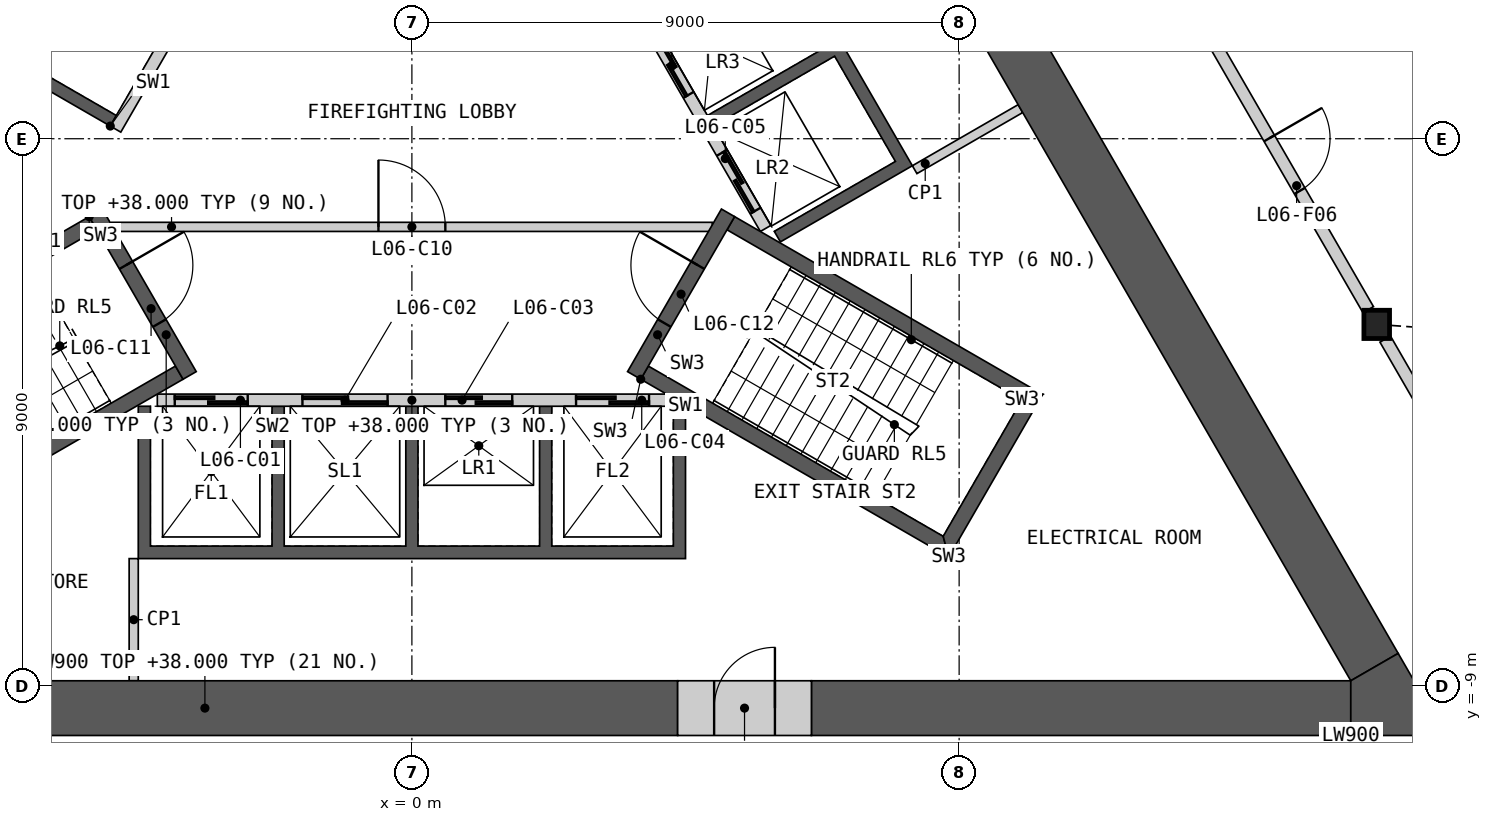
"""IFC4 building model, lengths in metres.
Left out: names, types, materials, properties, quantities, classifications, styles, units other than length and angle.
Written with IfcOpenShell. Run it as: python <this file> out.ifc"""

import sys

from ifc_helpers import new_model, si_unit, direction, frame, frame_2d, origin, origin_2d, place, context, subcontext, project, spatial, polyline, rectangle, i_section, outline, extrude, element, fill, save


model = new_model("IFC4")
c1 = context("Model", 3, precision=1e-05, world=origin(), true_north=direction((0.0, 1.0)))
c2 = subcontext(c1, "Body", "Model", "MODEL_VIEW")
j1 = project(units=[si_unit("LENGTHUNIT", "METRE"), si_unit("PLANEANGLEUNIT", "RADIAN")], contexts=[c1])
p1 = place(None, origin())
s1 = spatial("IfcSite", under=j1, at=p1, CompositionType="ELEMENT")
p2 = place(p1, origin())
s2 = spatial("IfcBuilding", under=s1, at=p2, CompositionType="ELEMENT")
p3 = place(p2, frame((0.0, 0.0, 34.2)))
s3 = spatial("IfcBuildingStorey", under=s2, at=p3, CompositionType="ELEMENT", Elevation=34.2)
p4 = place(p3, frame((15.868, -3.054, 0.0), z_axis=(0.0, 0.0, 1.0), x_axis=(1.0, 0.0, 0.0)))
e1 = element("IfcColumn", 1, at=p4, inside=s3, PredefinedType="COLUMN", context=c2, shape_type="SweptSolid", body=[
    extrude(i_section(OverallWidth=0.421, OverallDepth=0.465, WebThickness=0.045, FlangeThickness=0.072, at=origin_2d()), origin(), (0.0, 0.0, 1.0), 4.2),
])
p5 = place(p3, origin())
e2 = element("IfcWall", 2, at=p5, inside=s3, PredefinedType="SHEAR", context=c2, shape_type="SweptSolid", body=[
    extrude(outline(polyline([(4.5, -4.4), (4.5, -6.906), (-4.5, -6.906), (-4.5, -4.4), (-4.3, -4.4), (-4.3, -6.7), (-2.3, -6.7), (-2.3, -4.4), (-2.1, -4.4), (-2.1, -6.7), (-0.1, -6.7), (-0.1, -4.4), (0.1, -4.4), (0.1, -6.7), (2.1, -6.7), (2.1, -4.4), (2.3, -4.4), (2.3, -6.7), (4.3, -6.7), (4.3, -4.4), (4.5, -4.4)])), origin(), (0.0, 0.0, 1.0), 3.8),
])
p6 = place(p3, frame((-4.187, -4.3, 0.0), z_axis=(0.0, 0.0, 1.0), x_axis=(1.0, 0.0, 0.0)))
e3 = element("IfcWall", 3, at=p6, inside=s3, PredefinedType="SOLIDWALL", context=c2, shape_type="SweptSolid", body=[
    extrude(rectangle(XDim=8.373, YDim=0.2, at=frame_2d((4.187, 0.0))), origin(), (0.0, 0.0, 1.0), 3.8),
])
p7 = place(p6, frame((0.287, 0.0, 0.0)))
e4 = element("IfcOpeningElement", 4, at=p7, cuts=e3, PredefinedType="OPENING", context=c2, shape_type="SweptSolid", body=[
    extrude(rectangle(XDim=1.2, YDim=2.1, at=frame_2d((0.6, 1.05))), frame((0.0, 0.11, 0.0), z_axis=(0.0, -1.0, 0.0), x_axis=(1.0, 0.0, 0.0)), (0.0, 0.0, 1.0), 0.22),
])
p8 = place(p6, frame((2.387, 0.0, 0.0)))
e5 = element("IfcOpeningElement", 5, at=p8, cuts=e3, PredefinedType="OPENING", context=c2, shape_type="SweptSolid", body=[
    extrude(rectangle(XDim=1.4, YDim=2.1, at=frame_2d((0.7, 1.05))), frame((0.0, 0.11, 0.0), z_axis=(0.0, -1.0, 0.0), x_axis=(1.0, 0.0, 0.0)), (0.0, 0.0, 1.0), 0.22),
])
p9 = place(p6, frame((4.737, 0.0, 0.0)))
e6 = element("IfcOpeningElement", 6, at=p9, cuts=e3, PredefinedType="OPENING", context=c2, shape_type="SweptSolid", body=[
    extrude(rectangle(XDim=1.1, YDim=2.1, at=frame_2d((0.55, 1.05))), frame((0.0, 0.11, 0.0), z_axis=(0.0, -1.0, 0.0), x_axis=(1.0, 0.0, 0.0)), (0.0, 0.0, 1.0), 0.22),
])
p10 = place(p6, frame((6.887, 0.0, 0.0)))
e7 = element("IfcOpeningElement", 7, at=p10, cuts=e3, PredefinedType="OPENING", context=c2, shape_type="SweptSolid", body=[
    extrude(rectangle(XDim=1.2, YDim=2.1, at=frame_2d((0.6, 1.05))), frame((0.0, 0.11, 0.0), z_axis=(0.0, -1.0, 0.0), x_axis=(1.0, 0.0, 0.0)), (0.0, 0.0, 1.0), 0.22),
])
p11 = place(p3, origin())
e8 = element("IfcWall", 8, at=p11, inside=s3, PredefinedType="SHEAR", context=c2, shape_type="SweptSolid", body=[
    extrude(outline(polyline([(2.66, 4.192), (4.831, 5.445), (8.231, -0.444), (6.061, -1.697), (5.96, -1.524), (7.952, -0.374), (6.952, 1.358), (4.96, 0.208), (4.861, 0.381), (6.852, 1.531), (5.852, 3.263), (3.861, 2.113), (3.76, 2.287), (5.752, 3.437), (4.752, 5.169), (2.76, 4.019), (2.66, 4.192)])), origin(), (0.0, 0.0, 1.0), 3.8),
])
p12 = place(p3, frame((5.817, -1.476, 0.0), z_axis=(0.0, 0.0, 1.0), x_axis=(-0.500002616675, 0.866023893041, 0.0)))
e9 = element("IfcWall", 9, at=p12, inside=s3, PredefinedType="SOLIDWALL", context=c2, shape_type="SweptSolid", body=[
    extrude(rectangle(XDim=8.373, YDim=0.2, at=frame_2d((4.187, 0.0))), origin(), (0.0, 0.0, 1.0), 3.8),
])
p13 = place(p12, frame((0.337, 0.0, 0.0)))
e10 = element("IfcOpeningElement", 10, at=p13, cuts=e9, PredefinedType="OPENING", context=c2, shape_type="SweptSolid", body=[
    extrude(rectangle(XDim=1.1, YDim=2.1, at=frame_2d((0.55, 1.05))), frame((0.0, 0.11, 0.0), z_axis=(0.0, -1.0, 0.0), x_axis=(1.0, 0.0, 0.0)), (0.0, 0.0, 1.0), 0.22),
])
p14 = place(p12, frame((2.537, 0.0, 0.0)))
e11 = element("IfcOpeningElement", 11, at=p14, cuts=e9, PredefinedType="OPENING", context=c2, shape_type="SweptSolid", body=[
    extrude(rectangle(XDim=1.1, YDim=2.1, at=frame_2d((0.55, 1.05))), frame((0.0, 0.11, 0.0), z_axis=(0.0, -1.0, 0.0), x_axis=(1.0, 0.0, 0.0)), (0.0, 0.0, 1.0), 0.22),
])
p15 = place(p12, frame((4.737, 0.0, 0.0)))
e12 = element("IfcOpeningElement", 12, at=p15, cuts=e9, PredefinedType="OPENING", context=c2, shape_type="SweptSolid", body=[
    extrude(rectangle(XDim=1.1, YDim=2.1, at=frame_2d((0.55, 1.05))), frame((0.0, 0.11, 0.0), z_axis=(0.0, -1.0, 0.0), x_axis=(1.0, 0.0, 0.0)), (0.0, 0.0, 1.0), 0.22),
])
p16 = place(p12, frame((7.037, 0.0, 0.0)))
e13 = element("IfcOpeningElement", 13, at=p16, cuts=e9, PredefinedType="OPENING", context=c2, shape_type="SweptSolid", body=[
    extrude(rectangle(XDim=0.9, YDim=2.1, at=frame_2d((0.45, 1.05))), frame((0.0, 0.11, 0.0), z_axis=(0.0, -1.0, 0.0), x_axis=(1.0, 0.0, 0.0)), (0.0, 0.0, 1.0), 0.22),
])
p17 = place(p3, origin())
e14 = element("IfcWall", 14, at=p17, inside=s3, PredefinedType="SHEAR", context=c2, shape_type="SweptSolid", body=[
    extrude(outline(polyline([(-4.96, 0.208), (-7.131, 1.461), (-3.731, 7.35), (-1.561, 6.097), (-1.66, 5.924), (-3.652, 7.074), (-5.752, 3.437), (-3.76, 2.287), (-3.861, 2.113), (-5.852, 3.263), (-6.852, 1.531), (-4.861, 0.381), (-4.96, 0.208)])), origin(), (0.0, 0.0, 1.0), 3.8),
])
p18 = place(p3, frame((-1.631, 5.776, 0.0), z_axis=(0.0, 0.0, 1.0), x_axis=(-0.499992876559, -0.866029516466, 0.0)))
e15 = element("IfcWall", 15, at=p18, inside=s3, PredefinedType="SOLIDWALL", context=c2, shape_type="SweptSolid", body=[
    extrude(rectangle(XDim=6.486, YDim=0.2, at=frame_2d((3.243, 0.0))), origin(), (0.0, 0.0, 1.0), 3.8),
])
p19 = place(p18, frame((1.537, 0.0, 0.0)))
e16 = element("IfcOpeningElement", 16, at=p19, cuts=e15, PredefinedType="OPENING", context=c2, shape_type="SweptSolid", body=[
    extrude(rectangle(XDim=0.9, YDim=2.1, at=frame_2d((0.45, 1.05))), frame((0.0, 0.11, 0.0), z_axis=(0.0, -1.0, 0.0), x_axis=(1.0, 0.0, 0.0)), (0.0, 0.0, 1.0), 0.22),
])
p20 = place(p3, frame((-4.941, -1.45, 0.0), z_axis=(0.0, 0.0, 1.0), x_axis=(1.0, 0.0, 0.0)))
e17 = element("IfcWall", 17, at=p20, inside=s3, PredefinedType="PARTITIONING", context=c2, shape_type="SweptSolid", body=[
    extrude(rectangle(XDim=9.882, YDim=0.15, at=frame_2d((4.941, 0.0))), origin(), (0.0, 0.0, 1.0), 3.8),
])
p21 = place(p20, frame((4.391, 0.0, 0.0)))
e18 = element("IfcOpeningElement", 18, at=p21, cuts=e17, PredefinedType="OPENING", context=c2, shape_type="SweptSolid", body=[
    extrude(rectangle(XDim=1.1, YDim=2.1, at=frame_2d((0.55, 1.05))), frame((0.0, 0.085, 0.0), z_axis=(0.0, -1.0, 0.0), x_axis=(1.0, 0.0, 0.0)), (0.0, 0.0, 1.0), 0.17),
])
p22 = place(p3, origin())
e19 = element("IfcWall", 19, at=p22, inside=s3, PredefinedType="SHEAR", context=c2, shape_type="SweptSolid", body=[
    extrude(outline(polyline([(-5.307, -1.281), (-10.374, -4.206), (-10.032, -4.298), (-5.182, -1.498), (-5.307, -1.281)])), origin(), (0.0, 0.0, 1.0), 3.8),
])
p23 = place(p3, origin())
e20 = element("IfcWall", 20, at=p23, inside=s3, PredefinedType="SHEAR", context=c2, shape_type="SweptSolid", body=[
    extrude(outline(polyline([(-8.738, -6.539), (-8.83, -6.881), (-3.763, -3.956), (-3.888, -3.739), (-8.738, -6.539)])), origin(), (0.0, 0.0, 1.0), 3.8),
])
p24 = place(p3, frame((-5.199, -1.219, 0.0), z_axis=(0.0, 0.0, 1.0), x_axis=(0.499982516597, -0.866035497597, 0.0)))
e21 = element("IfcWall", 21, at=p24, inside=s3, PredefinedType="SHEAR", context=c2, shape_type="SweptSolid", body=[
    extrude(rectangle(XDim=3.088, YDim=0.25, at=frame_2d((1.544, 0.0))), origin(), (0.0, 0.0, 1.0), 3.8),
])
p25 = place(p24, frame((0.994, 0.0, 0.0)))
e22 = element("IfcOpeningElement", 22, at=p25, cuts=e21, PredefinedType="OPENING", context=c2, shape_type="SweptSolid", body=[
    extrude(rectangle(XDim=1.1, YDim=2.1, at=frame_2d((0.55, 1.05))), frame((0.0, 0.135, 0.0), z_axis=(0.0, -1.0, 0.0), x_axis=(1.0, 0.0, 0.0)), (0.0, 0.0, 1.0), 0.27),
])
p26 = place(p3, origin())
e23 = element("IfcWall", 23, at=p26, inside=s3, PredefinedType="SHEAR", context=c2, shape_type="SweptSolid", body=[
    extrude(outline(polyline([(3.763, -3.956), (8.83, -6.881), (8.738, -6.539), (3.888, -3.739), (3.763, -3.956)])), origin(), (0.0, 0.0, 1.0), 3.8),
])
p27 = place(p3, origin())
e24 = element("IfcWall", 24, at=p27, inside=s3, PredefinedType="SHEAR", context=c2, shape_type="SweptSolid", body=[
    extrude(outline(polyline([(8.83, -6.881), (10.374, -4.206), (10.032, -4.298), (8.738, -6.539), (8.83, -6.881)])), origin(), (0.0, 0.0, 1.0), 3.8),
])
p28 = place(p3, origin())
e25 = element("IfcWall", 25, at=p28, inside=s3, PredefinedType="SHEAR", context=c2, shape_type="SweptSolid", body=[
    extrude(outline(polyline([(10.032, -4.298), (10.374, -4.206), (5.307, -1.281), (5.182, -1.498), (10.032, -4.298)])), origin(), (0.0, 0.0, 1.0), 3.8),
])
p29 = place(p3, frame((3.655, -3.893, 0.0), z_axis=(0.0, 0.0, 1.0), x_axis=(0.499982516597, 0.866035497597, 0.0)))
e26 = element("IfcWall", 26, at=p29, inside=s3, PredefinedType="SHEAR", context=c2, shape_type="SweptSolid", body=[
    extrude(rectangle(XDim=3.088, YDim=0.25, at=frame_2d((1.544, 0.0))), origin(), (0.0, 0.0, 1.0), 3.8),
])
p30 = place(p29, frame((0.994, 0.0, 0.0)))
e27 = element("IfcOpeningElement", 27, at=p30, cuts=e26, PredefinedType="OPENING", context=c2, shape_type="SweptSolid", body=[
    extrude(rectangle(XDim=1.1, YDim=2.1, at=frame_2d((0.55, 1.05))), frame((0.0, 0.135, 0.0), z_axis=(0.0, -1.0, 0.0), x_axis=(1.0, 0.0, 0.0)), (0.0, 0.0, 1.0), 0.27),
])
p31 = place(p3, frame((8.268, -0.509, 0.0), z_axis=(0.0, 0.0, 1.0), x_axis=(0.866035824272, 0.499981950752, 0.0)))
e28 = element("IfcWall", 28, at=p31, inside=s3, PredefinedType="PARTITIONING", context=c2, shape_type="SweptSolid", body=[
    extrude(rectangle(XDim=2.009, YDim=0.15, at=frame_2d((1.004, 0.0))), origin(), (0.0, 0.0, 1.0), 3.8),
])
p32 = place(p3, frame((-4.575, -6.906, 0.0), z_axis=(0.0, 0.0, 1.0), x_axis=(0.0, -1.0, 0.0)))
e29 = element("IfcWall", 29, at=p32, inside=s3, PredefinedType="PARTITIONING", context=c2, shape_type="SweptSolid", body=[
    extrude(rectangle(XDim=2.009, YDim=0.15, at=frame_2d((1.004, 0.0))), origin(), (0.0, 0.0, 1.0), 3.8),
])
p33 = place(p3, frame((-11.179, -9.365, 0.0), z_axis=(0.0, 0.0, 1.0), x_axis=(1.0, 0.0, 0.0)))
e30 = element("IfcWall", 30, at=p33, inside=s3, PredefinedType="SHEAR", context=c2, shape_type="SweptSolid", body=[
    extrude(rectangle(XDim=15.55, YDim=0.9, at=frame_2d((7.775, 0.0))), origin(), (0.0, 0.0, 1.0), 3.8),
])
p34 = place(p3, frame((6.571, -9.365, 0.0), z_axis=(0.0, 0.0, 1.0), x_axis=(1.0, 0.0, 0.0)))
e31 = element("IfcWall", 31, at=p34, inside=s3, PredefinedType="SHEAR", context=c2, shape_type="SweptSolid", body=[
    extrude(rectangle(XDim=8.871, YDim=0.9, at=frame_2d((4.435, 0.0))), origin(), (0.0, 0.0, 1.0), 3.8),
])
p35 = place(p3, frame((15.831, -8.69, 0.0), z_axis=(0.0, 0.0, 1.0), x_axis=(-0.499997452939, 0.866026874326, 0.0)))
e32 = element("IfcWall", 32, at=p35, inside=s3, PredefinedType="SHEAR", context=c2, shape_type="SweptSolid", body=[
    extrude(rectangle(XDim=13.141, YDim=0.9, at=frame_2d((6.571, 0.0))), origin(), (0.0, 0.0, 1.0), 3.8),
])
p36 = place(p3, origin())
e33 = element("IfcWall", 33, at=p36, inside=s3, PredefinedType="SHEAR", context=c2, shape_type="SweptSolid", body=[
    extrude(outline(polyline([(15.441, -9.815), (15.441, -8.915), (16.221, -8.465), (17.0, -9.815), (15.441, -9.815)])), origin(), (0.0, 0.0, 1.0), 3.8),
])
p37 = place(p3, frame((4.371, -9.365, 0.0), z_axis=(0.0, 0.0, 1.0), x_axis=(1.0, 0.0, 0.0)))
e34 = element("IfcWall", 34, at=p37, inside=s3, PredefinedType="SHEAR", context=c2, shape_type="SweptSolid", body=[
    extrude(rectangle(XDim=2.2, YDim=0.9, at=frame_2d((1.1, 0.0))), origin(), (0.0, 0.0, 1.0), 3.8),
])
p38 = place(p37, frame((0.6, 0.0, 0.0)))
e35 = element("IfcOpeningElement", 35, at=p38, cuts=e34, PredefinedType="OPENING", context=c2, shape_type="SweptSolid", body=[
    extrude(rectangle(XDim=1.0, YDim=2.1, at=frame_2d((0.5, 1.05))), frame((0.0, 0.46, 0.0), z_axis=(0.0, -1.0, 0.0), x_axis=(1.0, 0.0, 0.0)), (0.0, 0.0, 1.0), 0.92),
])
p39 = place(p3, frame((10.719, 5.865, 0.0), z_axis=(0.0, 0.0, 1.0), x_axis=(0.49999175339, -0.866030164915, 0.0)))
e36 = element("IfcWall", 36, at=p39, inside=s3, PredefinedType="PARTITIONING", context=c2, shape_type="SweptSolid", body=[
    extrude(rectangle(XDim=10.019, YDim=0.2, at=frame_2d((5.009, 0.0))), origin(), (0.0, 0.0, 1.0), 3.8),
])
p40 = place(p39, frame((6.764, 0.0, 0.0)))
e37 = element("IfcOpeningElement", 37, at=p40, cuts=e36, PredefinedType="OPENING", context=c2, shape_type="SweptSolid", body=[
    extrude(rectangle(XDim=1.0, YDim=2.1, at=frame_2d((0.5, 1.05))), frame((0.0, 0.11, 0.0), z_axis=(0.0, -1.0, 0.0), x_axis=(1.0, 0.0, 0.0)), (0.0, 0.0, 1.0), 0.22),
])
p41 = place(p3, frame((16.008, -3.296, 0.0), z_axis=(0.0, 0.0, 1.0), x_axis=(0.499984737558, -0.86603421538, 0.0)))
e38 = element("IfcWall", 38, at=p41, inside=s3, PredefinedType="PARTITIONING", context=c2, shape_type="SweptSolid", body=[
    extrude(rectangle(XDim=6.473, YDim=0.2, at=frame_2d((3.236, 0.0))), origin(), (0.0, 0.0, 1.0), 3.8),
])
p42 = place(p41, frame((4.512, 0.0, 0.0)))
e39 = element("IfcOpeningElement", 39, at=p42, cuts=e38, PredefinedType="OPENING", context=c2, shape_type="SweptSolid", body=[
    extrude(rectangle(XDim=1.0, YDim=2.1, at=frame_2d((0.5, 1.05))), frame((0.0, 0.11, 0.0), z_axis=(0.0, -1.0, 0.0), x_axis=(1.0, 0.0, 0.0)), (0.0, 0.0, 1.0), 0.22),
])
p43 = place(p7, origin())
e40 = element("IfcDoor", 40, at=p43, inside=s3, OperationType="SLIDING_TO_LEFT", PredefinedType="DOOR", context=c2, shape_type="SweptSolid", body=[
    extrude(rectangle(XDim=1.2, YDim=2.1, at=frame_2d((0.6, 1.05))), frame((0.0, 0.025, 0.0), z_axis=(0.0, -1.0, 0.0), x_axis=(1.0, 0.0, 0.0)), (0.0, 0.0, 1.0), 0.05),
])
fill(e4, e40)
p44 = place(p8, origin())
e41 = element("IfcDoor", 41, at=p44, inside=s3, OperationType="SLIDING_TO_LEFT", PredefinedType="DOOR", context=c2, shape_type="SweptSolid", body=[
    extrude(rectangle(XDim=1.4, YDim=2.1, at=frame_2d((0.7, 1.05))), frame((0.0, 0.025, 0.0), z_axis=(0.0, -1.0, 0.0), x_axis=(1.0, 0.0, 0.0)), (0.0, 0.0, 1.0), 0.05),
])
fill(e5, e41)
p45 = place(p9, origin())
e42 = element("IfcDoor", 42, at=p45, inside=s3, OperationType="SLIDING_TO_LEFT", PredefinedType="DOOR", context=c2, shape_type="SweptSolid", body=[
    extrude(rectangle(XDim=1.1, YDim=2.1, at=frame_2d((0.55, 1.05))), frame((0.0, 0.025, 0.0), z_axis=(0.0, -1.0, 0.0), x_axis=(1.0, 0.0, 0.0)), (0.0, 0.0, 1.0), 0.05),
])
fill(e6, e42)
p46 = place(p10, origin())
e43 = element("IfcDoor", 43, at=p46, inside=s3, OperationType="SLIDING_TO_LEFT", PredefinedType="DOOR", context=c2, shape_type="SweptSolid", body=[
    extrude(rectangle(XDim=1.2, YDim=2.1, at=frame_2d((0.6, 1.05))), frame((0.0, 0.025, 0.0), z_axis=(0.0, -1.0, 0.0), x_axis=(1.0, 0.0, 0.0)), (0.0, 0.0, 1.0), 0.05),
])
fill(e7, e43)
p47 = place(p13, origin())
e44 = element("IfcDoor", 44, at=p47, inside=s3, OperationType="SLIDING_TO_LEFT", PredefinedType="DOOR", context=c2, shape_type="SweptSolid", body=[
    extrude(rectangle(XDim=1.1, YDim=2.1, at=frame_2d((0.55, 1.05))), frame((0.0, 0.025, 0.0), z_axis=(0.0, -1.0, 0.0), x_axis=(1.0, 0.0, 0.0)), (0.0, 0.0, 1.0), 0.05),
])
fill(e10, e44)
p48 = place(p14, origin())
e45 = element("IfcDoor", 45, at=p48, inside=s3, OperationType="SLIDING_TO_LEFT", PredefinedType="DOOR", context=c2, shape_type="SweptSolid", body=[
    extrude(rectangle(XDim=1.1, YDim=2.1, at=frame_2d((0.55, 1.05))), frame((0.0, 0.025, 0.0), z_axis=(0.0, -1.0, 0.0), x_axis=(1.0, 0.0, 0.0)), (0.0, 0.0, 1.0), 0.05),
])
fill(e11, e45)
p49 = place(p21, origin())
e46 = element("IfcDoor", 46, at=p49, inside=s3, OperationType="SINGLE_SWING_LEFT", PredefinedType="DOOR", context=c2, shape_type="SweptSolid", body=[
    extrude(rectangle(XDim=1.1, YDim=2.1, at=frame_2d((0.55, 1.05))), frame((0.0, 0.025, 0.0), z_axis=(0.0, -1.0, 0.0), x_axis=(1.0, 0.0, 0.0)), (0.0, 0.0, 1.0), 0.05),
])
fill(e18, e46)
p50 = place(p25, origin())
e47 = element("IfcDoor", 47, at=p50, inside=s3, OperationType="SINGLE_SWING_LEFT", PredefinedType="DOOR", context=c2, shape_type="SweptSolid", body=[
    extrude(rectangle(XDim=1.1, YDim=2.1, at=frame_2d((0.55, 1.05))), frame((0.0, 0.025, 0.0), z_axis=(0.0, -1.0, 0.0), x_axis=(1.0, 0.0, 0.0)), (0.0, 0.0, 1.0), 0.05),
])
fill(e22, e47)
p51 = place(p30, origin())
e48 = element("IfcDoor", 48, at=p51, inside=s3, OperationType="SINGLE_SWING_RIGHT", PredefinedType="DOOR", context=c2, shape_type="SweptSolid", body=[
    extrude(rectangle(XDim=1.1, YDim=2.1, at=frame_2d((0.55, 1.05))), frame((0.0, 0.025, 0.0), z_axis=(0.0, -1.0, 0.0), x_axis=(1.0, 0.0, 0.0)), (0.0, 0.0, 1.0), 0.05),
])
fill(e27, e48)
p52 = place(p38, origin())
e49 = element("IfcDoor", 49, at=p52, inside=s3, OperationType="SINGLE_SWING_RIGHT", PredefinedType="DOOR", context=c2, shape_type="SweptSolid", body=[
    extrude(rectangle(XDim=1.0, YDim=2.1, at=frame_2d((0.5, 1.05))), frame((0.0, 0.205, 0.0), z_axis=(0.0, -1.0, 0.0), x_axis=(1.0, 0.0, 0.0)), (0.0, 0.0, 1.0), 0.05),
])
fill(e35, e49)
p53 = place(p40, origin())
e50 = element("IfcDoor", 50, at=p53, inside=s3, OperationType="SINGLE_SWING_LEFT", PredefinedType="DOOR", context=c2, shape_type="SweptSolid", body=[
    extrude(rectangle(XDim=1.0, YDim=2.1, at=frame_2d((0.5, 1.05))), frame((0.0, 0.025, 0.0), z_axis=(0.0, -1.0, 0.0), x_axis=(1.0, 0.0, 0.0)), (0.0, 0.0, 1.0), 0.05),
])
fill(e37, e50)
save(model, sys.argv[1])
